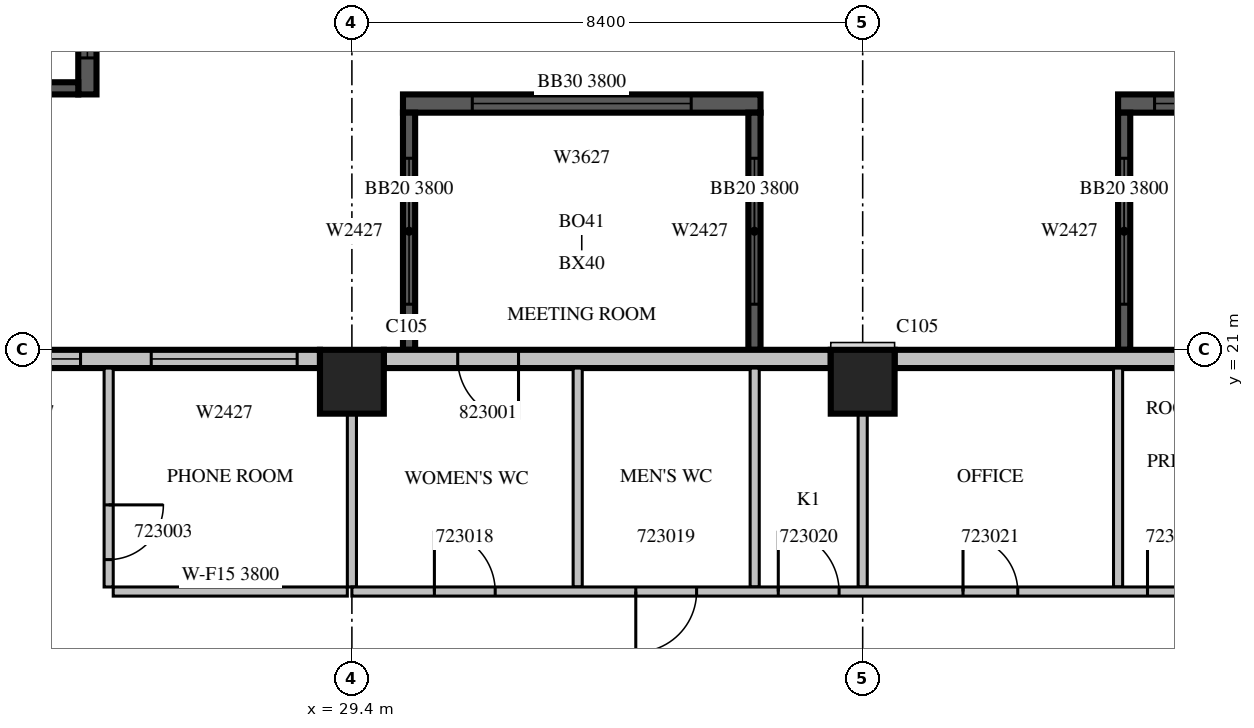
"""IFC4 building model, lengths in metres.
Left out: names, types, materials, properties, quantities, classifications, styles, units other than length and angle.
Written with IfcOpenShell. Run it as: python <this file> out.ifc"""

import sys

from ifc_helpers import new_model, si_unit, direction, frame, frame_2d, origin, origin_2d, place, context, subcontext, project, spatial, rectangle, extrude, source, transform, mapped, element, fill, save


model = new_model("IFC4")
c1 = context("Model", 3, precision=1e-05, world=origin(), true_north=direction((0.0, 1.0)))
c2 = subcontext(c1, "Body", "Model", "MODEL_VIEW")
j1 = project(units=[si_unit("LENGTHUNIT", "METRE"), si_unit("PLANEANGLEUNIT", "RADIAN")], contexts=[c1])
p1 = place(None, origin())
s1 = spatial("IfcSite", under=j1, at=p1, CompositionType="ELEMENT")
p2 = place(p1, origin())
s2 = spatial("IfcBuilding", under=s1, at=p2, CompositionType="ELEMENT")
p3 = place(p2, frame((0.0, 0.0, 107.7)))
s3 = spatial("IfcBuildingStorey", under=s2, at=p3, CompositionType="ELEMENT", Elevation=107.7)
m1 = source(origin(), c2, "Body", "SweptSolid", [
    extrude(rectangle(XDim=1.05, YDim=1.05, at=origin_2d()), origin(), (0.0, 0.0, 1.0), 4.2),
])
for number, where, z_axis, x_axis in (
    (1, (29.4, 20.475, 0.0), (0.0, 0.0, 1.0), (1.0, 0.0, 0.0)),
    (2, (37.8, 20.475, 0.0), (0.0, 0.0, 1.0), (1.0, 0.0, 0.0)),
):
    element("IfcColumn", number, at=place(p3, frame(where, z_axis=z_axis, x_axis=x_axis)), inside=s3, PredefinedType="COLUMN", context=c2, shape_type="MappedRepresentation", body=[
        mapped(m1, transform((0.0, 0.0, 0.0), scale=1.0)),
    ])
m2 = source(origin(), c2, "Body", "SweptSolid", [
    extrude(rectangle(XDim=5.88, YDim=0.3, at=frame_2d((2.94, 0.0))), origin(), (0.0, 0.0, 1.0), 3.8),
])
p4 = place(p3, frame((36.12, 25.05, 0.0), z_axis=(0.0, 0.0, 1.0), x_axis=(-1.0, 0.0, 0.0)))
e3 = element("IfcWall", 3, at=p4, inside=s3, PredefinedType="SOLIDWALL", context=c2, shape_type="MappedRepresentation", body=[
    mapped(m2, transform((0.0, 0.0, 0.0), scale=1.0)),
])
m3 = source(origin(), c2, "Body", "SweptSolid", [
    extrude(rectangle(XDim=3.6, YDim=2.7, at=frame_2d((1.8, 1.35))), frame((0.0, 0.16, 0.0), z_axis=(0.0, -1.0, 0.0), x_axis=(1.0, 0.0, 0.0)), (0.0, 0.0, 1.0), 0.32),
])
p5 = place(p4, frame((1.14, 0.0, 0.6)))
e4 = element("IfcOpeningElement", 4, at=p5, cuts=e3, PredefinedType="OPENING", context=c2, shape_type="MappedRepresentation", body=[
    mapped(m3, transform((0.0, 0.0, 0.0), scale=1.0)),
])
m4 = source(origin(), c2, "Body", "SweptSolid", [
    extrude(rectangle(XDim=3.9, YDim=0.2, at=frame_2d((1.95, 0.0))), origin(), (0.0, 0.0, 1.0), 3.8),
])
p6 = place(p3, frame((36.02, 21.0, 0.0), z_axis=(0.0, 0.0, 1.0), x_axis=(0.0, 1.0, 0.0)))
e5 = element("IfcWall", 5, at=p6, inside=s3, PredefinedType="SOLIDWALL", context=c2, shape_type="MappedRepresentation", body=[
    mapped(m4, transform((0.0, 0.0, 0.0), scale=1.0)),
])
m5 = source(origin(), c2, "Body", "SweptSolid", [
    extrude(rectangle(XDim=2.4, YDim=2.7, at=frame_2d((1.2, 1.35))), frame((0.0, 0.11, 0.0), z_axis=(0.0, -1.0, 0.0), x_axis=(1.0, 0.0, 0.0)), (0.0, 0.0, 1.0), 0.22),
])
p7 = place(p6, frame((0.75, 0.0, 0.6)))
e6 = element("IfcOpeningElement", 6, at=p7, cuts=e5, PredefinedType="OPENING", context=c2, shape_type="MappedRepresentation", body=[
    mapped(m5, transform((0.0, 0.0, 0.0), scale=1.0)),
])
p8 = place(p3, frame((30.34, 21.0, 0.0), z_axis=(0.0, 0.0, 1.0), x_axis=(0.0, 1.0, 0.0)))
e7 = element("IfcWall", 7, at=p8, inside=s3, PredefinedType="SOLIDWALL", context=c2, shape_type="MappedRepresentation", body=[
    mapped(m4, transform((0.0, 0.0, 0.0), scale=1.0)),
])
p9 = place(p8, frame((0.75, 0.0, 0.6)))
e8 = element("IfcOpeningElement", 8, at=p9, cuts=e7, PredefinedType="OPENING", context=c2, shape_type="MappedRepresentation", body=[
    mapped(m5, transform((0.0, 0.0, 0.0), scale=1.0)),
])
m6 = source(origin(), c2, "Body", "SweptSolid", [
    extrude(rectangle(XDim=4.2, YDim=0.3, at=frame_2d((2.1, 0.0))), origin(), (0.0, 0.0, 1.0), 3.8),
])
p10 = place(p3, frame((46.2, 25.05, 0.0), z_axis=(0.0, 0.0, 1.0), x_axis=(-1.0, 0.0, 0.0)))
e9 = element("IfcWall", 9, at=p10, inside=s3, PredefinedType="SOLIDWALL", context=c2, shape_type="MappedRepresentation", body=[
    mapped(m6, transform((0.0, 0.0, 0.0), scale=1.0)),
])
m7 = source(origin(), c2, "Body", "SweptSolid", [
    extrude(rectangle(XDim=3.0, YDim=2.7, at=frame_2d((1.5, 1.35))), frame((0.0, 0.16, 0.0), z_axis=(0.0, -1.0, 0.0), x_axis=(1.0, 0.0, 0.0)), (0.0, 0.0, 1.0), 0.32),
])
p11 = place(p10, frame((0.6, 0.0, 0.6)))
e10 = element("IfcOpeningElement", 10, at=p11, cuts=e9, PredefinedType="OPENING", context=c2, shape_type="MappedRepresentation", body=[
    mapped(m7, transform((0.0, 0.0, 0.0), scale=1.0)),
])
p12 = place(p3, frame((42.1, 21.0, 0.0), z_axis=(0.0, 0.0, 1.0), x_axis=(0.0, 1.0, 0.0)))
e11 = element("IfcWall", 11, at=p12, inside=s3, PredefinedType="SOLIDWALL", context=c2, shape_type="MappedRepresentation", body=[
    mapped(m4, transform((0.0, 0.0, 0.0), scale=1.0)),
])
p13 = place(p12, frame((0.75, 0.0, 0.6)))
e12 = element("IfcOpeningElement", 12, at=p13, cuts=e11, PredefinedType="OPENING", context=c2, shape_type="MappedRepresentation", body=[
    mapped(m5, transform((0.0, 0.0, 0.0), scale=1.0)),
])
m8 = source(origin(), c2, "Body", "SweptSolid", [
    extrude(rectangle(XDim=7.35, YDim=0.3, at=frame_2d((3.675, 0.0))), origin(), (0.0, 0.0, 1.0), 3.8),
])
p14 = place(p3, frame((45.675, 20.85, 0.0), z_axis=(0.0, 0.0, 1.0), x_axis=(-1.0, 0.0, 0.0)))
e13 = element("IfcWall", 13, at=p14, inside=s3, PredefinedType="STANDARD", context=c2, shape_type="MappedRepresentation", body=[
    mapped(m8, transform((0.0, 0.0, 0.0), scale=1.0)),
])
m9 = source(origin(), c2, "Body", "SweptSolid", [
    extrude(rectangle(XDim=1.0, YDim=2.1, at=frame_2d((0.5, 1.05))), frame((0.0, 0.16, 0.0), z_axis=(0.0, -1.0, 0.0), x_axis=(1.0, 0.0, 0.0)), (0.0, 0.0, 1.0), 0.32),
])
p15 = place(p14, frame((0.375, 0.0, 0.0)))
e14 = element("IfcOpeningElement", 14, at=p15, cuts=e13, PredefinedType="OPENING", context=c2, shape_type="MappedRepresentation", body=[
    mapped(m9, transform((0.0, 0.0, 0.0), scale=1.0)),
])
p16 = place(p3, frame((37.275, 20.85, 0.0), z_axis=(0.0, 0.0, 1.0), x_axis=(-1.0, 0.0, 0.0)))
e15 = element("IfcWall", 15, at=p16, inside=s3, PredefinedType="STANDARD", context=c2, shape_type="MappedRepresentation", body=[
    mapped(m8, transform((0.0, 0.0, 0.0), scale=1.0)),
])
p17 = place(p16, frame((5.135, 0.0, 0.0)))
e16 = element("IfcOpeningElement", 16, at=p17, cuts=e15, PredefinedType="OPENING", context=c2, shape_type="MappedRepresentation", body=[
    mapped(m9, transform((0.0, 0.0, 0.0), scale=1.0)),
])
m10 = source(origin(), c2, "Body", "SweptSolid", [
    extrude(rectangle(XDim=6.875, YDim=0.3, at=frame_2d((3.438, 0.0))), origin(), (0.0, 0.0, 1.0), 3.8),
])
p18 = place(p3, frame((28.875, 20.85, 0.0), z_axis=(0.0, 0.0, 1.0), x_axis=(-1.0, 0.0, 0.0)))
e17 = element("IfcWall", 17, at=p18, inside=s3, PredefinedType="STANDARD", context=c2, shape_type="MappedRepresentation", body=[
    mapped(m10, transform((0.0, 0.0, 0.0), scale=1.0)),
])
m11 = source(origin(), c2, "Body", "SweptSolid", [
    extrude(rectangle(XDim=2.4, YDim=2.7, at=frame_2d((1.2, 1.35))), frame((0.0, 0.16, 0.0), z_axis=(0.0, -1.0, 0.0), x_axis=(1.0, 0.0, 0.0)), (0.0, 0.0, 1.0), 0.32),
])
p19 = place(p18, frame((0.375, 0.0, 0.6)))
e18 = element("IfcOpeningElement", 18, at=p19, cuts=e17, PredefinedType="OPENING", context=c2, shape_type="MappedRepresentation", body=[
    mapped(m11, transform((0.0, 0.0, 0.0), scale=1.0)),
])
m12 = source(origin(), c2, "Body", "SweptSolid", [
    extrude(rectangle(XDim=1.8, YDim=2.7, at=frame_2d((0.9, 1.35))), frame((0.0, 0.16, 0.0), z_axis=(0.0, -1.0, 0.0), x_axis=(1.0, 0.0, 0.0)), (0.0, 0.0, 1.0), 0.32),
])
p20 = place(p18, frame((3.938, 0.0, 0.6)))
e19 = element("IfcOpeningElement", 19, at=p20, cuts=e17, PredefinedType="OPENING", context=c2, shape_type="MappedRepresentation", body=[
    mapped(m12, transform((0.0, 0.0, 0.0), scale=1.0)),
])
m13 = source(origin(), c2, "Body", "SweptSolid", [
    extrude(rectangle(XDim=4.2, YDim=0.3, at=frame_2d((2.1, 0.0))), origin(), (0.0, 0.0, 1.0), 3.79),
])
p21 = place(p3, frame((25.05, 25.2, 0.0), z_axis=(0.0, 0.0, 1.0), x_axis=(0.0, 1.0, 0.0)))
e20 = element("IfcWall", 20, at=p21, inside=s3, PredefinedType="SOLIDWALL", context=c2, shape_type="MappedRepresentation", body=[
    mapped(m13, transform((0.0, 0.0, 0.0), scale=1.0)),
])
p22 = place(p21, frame((0.6, 0.0, 0.6)))
e21 = element("IfcOpeningElement", 21, at=p22, cuts=e20, PredefinedType="OPENING", context=c2, shape_type="MappedRepresentation", body=[
    mapped(m7, transform((0.0, 0.0, 0.0), scale=1.0)),
])
m14 = source(origin(), c2, "Body", "SweptSolid", [
    extrude(rectangle(XDim=3.9, YDim=0.2, at=frame_2d((1.95, 0.0))), origin(), (0.0, 0.0, 1.0), 3.79),
])
p23 = place(p3, frame((21.0, 25.3, 0.0), z_axis=(0.0, 0.0, 1.0), x_axis=(1.0, 0.0, 0.0)))
e22 = element("IfcWall", 22, at=p23, inside=s3, PredefinedType="SOLIDWALL", context=c2, shape_type="MappedRepresentation", body=[
    mapped(m14, transform((0.0, 0.0, 0.0), scale=1.0)),
])
p24 = place(p23, frame((0.75, 0.0, 0.6)))
e23 = element("IfcOpeningElement", 23, at=p24, cuts=e22, PredefinedType="OPENING", context=c2, shape_type="MappedRepresentation", body=[
    mapped(m5, transform((0.0, 0.0, 0.0), scale=1.0)),
])
m15 = source(origin(), c2, "Body", "SweptSolid", [
    extrude(rectangle(XDim=3.6, YDim=0.15, at=frame_2d((1.8, 0.0))), origin(), (0.0, 0.0, 1.0), 3.8),
])
p25 = place(p3, frame((25.4, 20.7, 0.0), z_axis=(0.0, 0.0, 1.0), x_axis=(0.0, -1.0, 0.0)))
e24 = element("IfcWall", 24, at=p25, inside=s3, PredefinedType="PARTITIONING", context=c2, shape_type="MappedRepresentation", body=[
    mapped(m15, transform((0.0, 0.0, 0.0), scale=1.0)),
])
m16 = source(origin(), c2, "Body", "SweptSolid", [
    extrude(rectangle(XDim=0.9, YDim=2.1, at=frame_2d((0.45, 1.05))), frame((0.0, 0.085, 0.0), z_axis=(0.0, -1.0, 0.0), x_axis=(1.0, 0.0, 0.0)), (0.0, 0.0, 1.0), 0.17),
])
p26 = place(p25, frame((2.25, 0.0, 0.0)))
e25 = element("IfcOpeningElement", 25, at=p26, cuts=e24, PredefinedType="OPENING", context=c2, shape_type="MappedRepresentation", body=[
    mapped(m16, transform((0.0, 0.0, 0.0), scale=1.0)),
])
m17 = source(origin(), c2, "Body", "SweptSolid", [
    extrude(rectangle(XDim=3.85, YDim=0.15, at=frame_2d((1.925, 0.0))), origin(), (0.0, 0.0, 1.0), 3.8),
])
p27 = place(p3, frame((25.475, 17.025, 0.0), z_axis=(0.0, 0.0, 1.0), x_axis=(1.0, 0.0, 0.0)))
e26 = element("IfcWall", 26, at=p27, inside=s3, PredefinedType="PARTITIONING", context=c2, shape_type="MappedRepresentation", body=[
    mapped(m17, transform((0.0, 0.0, 0.0), scale=1.0)),
])
m18 = source(origin(), c2, "Body", "SweptSolid", [
    extrude(rectangle(XDim=2.851, YDim=0.15, at=frame_2d((1.425, 0.0))), origin(), (0.0, 0.0, 1.0), 3.8),
])
p28 = place(p3, frame((29.4, 17.1, 0.0), z_axis=(0.0, 0.0, 1.0), x_axis=(0.0, 1.0, 0.0)))
e27 = element("IfcWall", 27, at=p28, inside=s3, PredefinedType="PARTITIONING", context=c2, shape_type="MappedRepresentation", body=[
    mapped(m18, transform((0.0, 0.0, 0.0), scale=1.0)),
])
for number, where, z_axis, x_axis in (
    (28, (33.113, 20.7, 0.0), (0.0, 0.0, 1.0), (0.0, -1.0, 0.0)),
    (29, (36.024, 20.7, 0.0), (0.0, 0.0, 1.0), (0.0, -1.0, 0.0)),
):
    element("IfcWall", number, at=place(p3, frame(where, z_axis=z_axis, x_axis=x_axis)), inside=s3, PredefinedType="PARTITIONING", context=c2, shape_type="MappedRepresentation", body=[
        mapped(m15, transform((0.0, 0.0, 0.0), scale=1.0)),
    ])
p29 = place(p3, frame((37.8, 17.1, 0.0), z_axis=(0.0, 0.0, 1.0), x_axis=(0.0, 1.0, 0.0)))
e30 = element("IfcWall", 30, at=p29, inside=s3, PredefinedType="PARTITIONING", context=c2, shape_type="MappedRepresentation", body=[
    mapped(m18, transform((0.0, 0.0, 0.0), scale=1.0)),
])
p30 = place(p3, frame((42.0, 17.1, 0.0), z_axis=(0.0, 0.0, 1.0), x_axis=(0.0, 1.0, 0.0)))
e31 = element("IfcWall", 31, at=p30, inside=s3, PredefinedType="PARTITIONING", context=c2, shape_type="MappedRepresentation", body=[
    mapped(m15, transform((0.0, 0.0, 0.0), scale=1.0)),
])
m19 = source(origin(), c2, "Body", "SweptSolid", [
    extrude(rectangle(XDim=37.5, YDim=0.15, at=frame_2d((18.75, 0.0))), origin(), (0.0, 0.0, 1.0), 3.3),
])
p31 = place(p3, frame((29.4, 17.025, 0.0), z_axis=(0.0, 0.0, 1.0), x_axis=(1.0, 0.0, 0.0)))
e32 = element("IfcWall", 32, at=p31, inside=s3, PredefinedType="PARTITIONING", context=c2, shape_type="MappedRepresentation", body=[
    mapped(m19, transform((0.0, 0.0, 0.0), scale=1.0)),
])
m20 = source(origin(), c2, "Body", "SweptSolid", [
    extrude(rectangle(XDim=1.0, YDim=2.1, at=frame_2d((0.5, 1.05))), frame((0.0, 0.085, 0.0), z_axis=(0.0, -1.0, 0.0), x_axis=(1.0, 0.0, 0.0)), (0.0, 0.0, 1.0), 0.17),
])
p32 = place(p31, frame((1.357, 0.0, 0.0)))
e33 = element("IfcOpeningElement", 33, at=p32, cuts=e32, PredefinedType="OPENING", context=c2, shape_type="MappedRepresentation", body=[
    mapped(m20, transform((0.0, 0.0, 0.0), scale=1.0)),
])
p33 = place(p31, frame((4.669, 0.0, 0.0)))
e34 = element("IfcOpeningElement", 34, at=p33, cuts=e32, PredefinedType="OPENING", context=c2, shape_type="MappedRepresentation", body=[
    mapped(m20, transform((0.0, 0.0, 0.0), scale=1.0)),
])
p34 = place(p31, frame((7.012, 0.0, 0.0)))
e35 = element("IfcOpeningElement", 35, at=p34, cuts=e32, PredefinedType="OPENING", context=c2, shape_type="MappedRepresentation", body=[
    mapped(m20, transform((0.0, 0.0, 0.0), scale=1.0)),
])
p35 = place(p31, frame((10.05, 0.0, 0.0)))
e36 = element("IfcOpeningElement", 36, at=p35, cuts=e32, PredefinedType="OPENING", context=c2, shape_type="MappedRepresentation", body=[
    mapped(m16, transform((0.0, 0.0, 0.0), scale=1.0)),
])
p36 = place(p31, frame((13.084, 0.0, 0.0)))
e37 = element("IfcOpeningElement", 37, at=p36, cuts=e32, PredefinedType="OPENING", context=c2, shape_type="MappedRepresentation", body=[
    mapped(m16, transform((0.0, 0.0, 0.0), scale=1.0)),
])
p37 = place(p31, frame((15.184, 0.0, 0.0)))
e38 = element("IfcOpeningElement", 38, at=p37, cuts=e32, PredefinedType="OPENING", context=c2, shape_type="MappedRepresentation", body=[
    mapped(m16, transform((0.0, 0.0, 0.0), scale=1.0)),
])
p38 = place(p31, frame((17.656, 0.0, 0.0)))
e39 = element("IfcOpeningElement", 39, at=p38, cuts=e32, PredefinedType="OPENING", context=c2, shape_type="MappedRepresentation", body=[
    mapped(m16, transform((0.0, 0.0, 0.0), scale=1.0)),
])
p39 = place(p31, frame((20.596, 0.0, 0.0)))
e40 = element("IfcOpeningElement", 40, at=p39, cuts=e32, PredefinedType="OPENING", context=c2, shape_type="MappedRepresentation", body=[
    mapped(m16, transform((0.0, 0.0, 0.0), scale=1.0)),
])
p40 = place(p31, frame((23.536, 0.0, 0.0)))
e41 = element("IfcOpeningElement", 41, at=p40, cuts=e32, PredefinedType="OPENING", context=c2, shape_type="MappedRepresentation", body=[
    mapped(m16, transform((0.0, 0.0, 0.0), scale=1.0)),
])
p41 = place(p31, frame((26.476, 0.0, 0.0)))
e42 = element("IfcOpeningElement", 42, at=p41, cuts=e32, PredefinedType="OPENING", context=c2, shape_type="MappedRepresentation", body=[
    mapped(m16, transform((0.0, 0.0, 0.0), scale=1.0)),
])
p42 = place(p31, frame((30.052, 0.0, 0.0)))
e43 = element("IfcOpeningElement", 43, at=p42, cuts=e32, PredefinedType="OPENING", context=c2, shape_type="MappedRepresentation", body=[
    mapped(m20, transform((0.0, 0.0, 0.0), scale=1.0)),
])
p43 = place(p31, frame((33.608, 0.0, 0.0)))
e44 = element("IfcOpeningElement", 44, at=p43, cuts=e32, PredefinedType="OPENING", context=c2, shape_type="MappedRepresentation", body=[
    mapped(m20, transform((0.0, 0.0, 0.0), scale=1.0)),
])
p44 = place(p31, frame((36.124, 0.0, 0.0)))
e45 = element("IfcOpeningElement", 45, at=p44, cuts=e32, PredefinedType="OPENING", context=c2, shape_type="MappedRepresentation", body=[
    mapped(m20, transform((0.0, 0.0, 0.0), scale=1.0)),
])
m21 = source(origin(), c2, "Body", "SweptSolid", [
    extrude(rectangle(XDim=3.6, YDim=2.7, at=frame_2d((1.8, 1.35))), frame((0.0, 0.03, 0.0), z_axis=(0.0, -1.0, 0.0), x_axis=(1.0, 0.0, 0.0)), (0.0, 0.0, 1.0), 0.06),
])
p45 = place(p5, origin())
e46 = element("IfcWindow", 46, at=p45, inside=s3, PartitioningType="SINGLE_PANEL", PredefinedType="WINDOW", context=c2, shape_type="MappedRepresentation", body=[
    mapped(m21, transform((0.0, 0.0, 0.0), scale=1.0)),
])
fill(e4, e46)
m22 = source(origin(), c2, "Body", "SweptSolid", [
    extrude(rectangle(XDim=2.4, YDim=2.7, at=frame_2d((1.2, 1.35))), frame((0.0, 0.03, 0.0), z_axis=(0.0, -1.0, 0.0), x_axis=(1.0, 0.0, 0.0)), (0.0, 0.0, 1.0), 0.06),
])
p46 = place(p7, origin())
e47 = element("IfcWindow", 47, at=p46, inside=s3, PartitioningType="SINGLE_PANEL", PredefinedType="WINDOW", context=c2, shape_type="MappedRepresentation", body=[
    mapped(m22, transform((0.0, 0.0, 0.0), scale=1.0)),
])
fill(e6, e47)
p47 = place(p9, origin())
e48 = element("IfcWindow", 48, at=p47, inside=s3, PartitioningType="SINGLE_PANEL", PredefinedType="WINDOW", context=c2, shape_type="MappedRepresentation", body=[
    mapped(m22, transform((0.0, 0.0, 0.0), scale=1.0)),
])
fill(e8, e48)
m23 = source(origin(), c2, "Body", "SweptSolid", [
    extrude(rectangle(XDim=3.0, YDim=2.7, at=frame_2d((1.5, 1.35))), frame((0.0, 0.03, 0.0), z_axis=(0.0, -1.0, 0.0), x_axis=(1.0, 0.0, 0.0)), (0.0, 0.0, 1.0), 0.06),
])
p48 = place(p11, origin())
e49 = element("IfcWindow", 49, at=p48, inside=s3, PartitioningType="SINGLE_PANEL", PredefinedType="WINDOW", context=c2, shape_type="MappedRepresentation", body=[
    mapped(m23, transform((0.0, 0.0, 0.0), scale=1.0)),
])
fill(e10, e49)
p49 = place(p13, origin())
e50 = element("IfcWindow", 50, at=p49, inside=s3, PartitioningType="SINGLE_PANEL", PredefinedType="WINDOW", context=c2, shape_type="MappedRepresentation", body=[
    mapped(m22, transform((0.0, 0.0, 0.0), scale=1.0)),
])
fill(e12, e50)
p50 = place(p19, origin())
e51 = element("IfcWindow", 51, at=p50, inside=s3, PartitioningType="SINGLE_PANEL", PredefinedType="WINDOW", context=c2, shape_type="MappedRepresentation", body=[
    mapped(m22, transform((0.0, 0.0, 0.0), scale=1.0)),
])
fill(e18, e51)
m24 = source(origin(), c2, "Body", "SweptSolid", [
    extrude(rectangle(XDim=1.8, YDim=2.7, at=frame_2d((0.9, 1.35))), frame((0.0, 0.03, 0.0), z_axis=(0.0, -1.0, 0.0), x_axis=(1.0, 0.0, 0.0)), (0.0, 0.0, 1.0), 0.06),
])
p51 = place(p20, origin())
e52 = element("IfcWindow", 52, at=p51, inside=s3, PartitioningType="SINGLE_PANEL", PredefinedType="WINDOW", context=c2, shape_type="MappedRepresentation", body=[
    mapped(m24, transform((0.0, 0.0, 0.0), scale=1.0)),
])
fill(e19, e52)
p52 = place(p22, origin())
e53 = element("IfcWindow", 53, at=p52, inside=s3, PartitioningType="SINGLE_PANEL", PredefinedType="WINDOW", context=c2, shape_type="MappedRepresentation", body=[
    mapped(m23, transform((0.0, 0.0, 0.0), scale=1.0)),
])
fill(e21, e53)
m25 = source(origin(), c2, "Body", "SweptSolid", [
    extrude(rectangle(XDim=0.9, YDim=2.1, at=frame_2d((0.45, 1.05))), frame((0.0, 0.025, 0.0), z_axis=(0.0, -1.0, 0.0), x_axis=(1.0, 0.0, 0.0)), (0.0, 0.0, 1.0), 0.05),
])
p53 = place(p26, origin())
e54 = element("IfcDoor", 54, at=p53, inside=s3, OperationType="SINGLE_SWING_LEFT", PredefinedType="DOOR", context=c2, shape_type="MappedRepresentation", body=[
    mapped(m25, transform((0.0, 0.0, 0.0), scale=1.0)),
])
fill(e25, e54)
m26 = source(origin(), c2, "Body", "SweptSolid", [
    extrude(rectangle(XDim=1.0, YDim=2.1, at=frame_2d((0.5, 1.05))), frame((0.0, 0.025, 0.0), z_axis=(0.0, -1.0, 0.0), x_axis=(1.0, 0.0, 0.0)), (0.0, 0.0, 1.0), 0.05),
])
p54 = place(p32, origin())
e55 = element("IfcDoor", 55, at=p54, inside=s3, OperationType="SINGLE_SWING_LEFT", PredefinedType="DOOR", context=c2, shape_type="MappedRepresentation", body=[
    mapped(m26, transform((0.0, 0.0, 0.0), scale=1.0)),
])
fill(e33, e55)
p55 = place(p33, origin())
e56 = element("IfcDoor", 56, at=p55, inside=s3, OperationType="SINGLE_SWING_RIGHT", PredefinedType="DOOR", context=c2, shape_type="MappedRepresentation", body=[
    mapped(m26, transform((0.0, 0.0, 0.0), scale=1.0)),
])
fill(e34, e56)
p56 = place(p34, origin())
e57 = element("IfcDoor", 57, at=p56, inside=s3, OperationType="SINGLE_SWING_LEFT", PredefinedType="DOOR", context=c2, shape_type="MappedRepresentation", body=[
    mapped(m26, transform((0.0, 0.0, 0.0), scale=1.0)),
])
fill(e35, e57)
p57 = place(p35, origin())
e58 = element("IfcDoor", 58, at=p57, inside=s3, OperationType="SINGLE_SWING_LEFT", PredefinedType="DOOR", context=c2, shape_type="MappedRepresentation", body=[
    mapped(m25, transform((0.0, 0.0, 0.0), scale=1.0)),
])
fill(e36, e58)
p58 = place(p36, origin())
e59 = element("IfcDoor", 59, at=p58, inside=s3, OperationType="SINGLE_SWING_LEFT", PredefinedType="DOOR", context=c2, shape_type="MappedRepresentation", body=[
    mapped(m25, transform((0.0, 0.0, 0.0), scale=1.0)),
])
fill(e37, e59)
p59 = place(p17, origin())
e60 = element("IfcDoor", 60, at=p59, inside=s3, OperationType="SINGLE_SWING_LEFT", PredefinedType="DOOR", context=c2, shape_type="MappedRepresentation", body=[
    mapped(m26, transform((0.0, 0.0, 0.0), scale=1.0)),
])
fill(e16, e60)
save(model, sys.argv[1])
